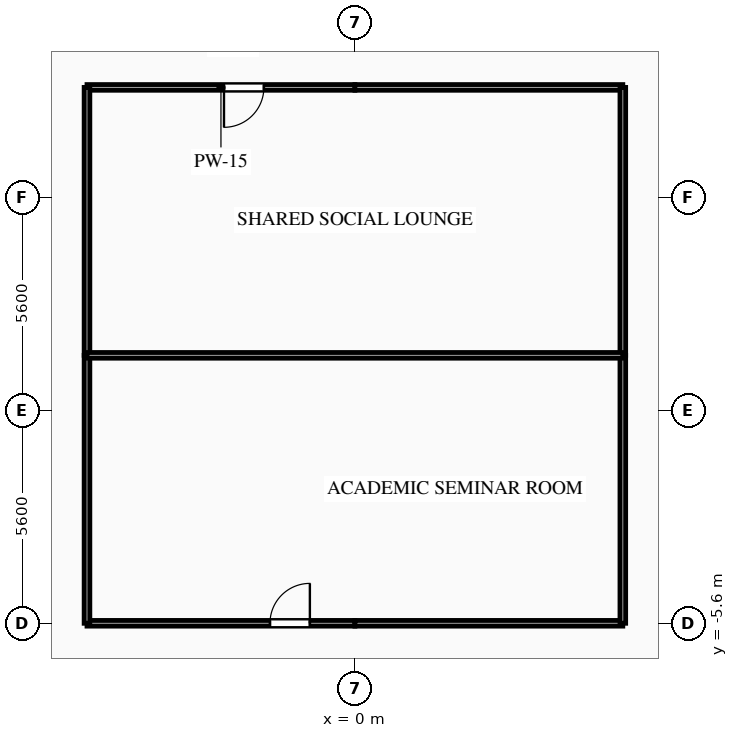
"""IFC4 building model, lengths in metres.
Left out: names, types, materials, properties, quantities, classifications, styles, units other than length and angle.
Written with IfcOpenShell. Run it as: python <this file> out.ifc"""

import sys

from ifc_helpers import new_model, si_unit, direction, frame, frame_2d, origin, place, context, subcontext, project, spatial, rectangle, extrude, element, fill, save


model = new_model("IFC4")
c1 = context("Model", 3, precision=1e-05, world=origin(), true_north=direction((0.0, 1.0)))
c2 = subcontext(c1, "Body", "Model", "MODEL_VIEW")
j1 = project(units=[si_unit("LENGTHUNIT", "METRE"), si_unit("PLANEANGLEUNIT", "RADIAN")], contexts=[c1])
p1 = place(None, origin())
s1 = spatial("IfcSite", under=j1, at=p1, CompositionType="ELEMENT")
p2 = place(p1, origin())
s2 = spatial("IfcBuilding", under=s1, at=p2, CompositionType="ELEMENT")
p3 = place(p2, frame((0.0, 0.0, 255.1)))
s3 = spatial("IfcBuildingStorey", under=s2, at=p3, CompositionType="ELEMENT", Elevation=255.1)
p4 = place(p3, frame((0.0, 8.5, 0.0), z_axis=(0.0, 0.0, 1.0), x_axis=(-1.0, 0.0, 0.0)))
e1 = element("IfcWall", 1, at=p4, inside=s3, PredefinedType="PARTITIONING", context=c2, shape_type="SweptSolid", body=[
    extrude(rectangle(XDim=7.05, YDim=0.15, at=frame_2d((3.525, 0.0))), origin(), (0.0, 0.0, 1.0), 3.04),
])
p5 = place(p4, frame((2.395, 0.0, 0.0)))
e2 = element("IfcOpeningElement", 2, at=p5, cuts=e1, PredefinedType="OPENING", context=c2, shape_type="SweptSolid", body=[
    extrude(rectangle(XDim=1.05, YDim=2.15, at=frame_2d((0.525, 1.075))), frame((0.0, 0.085, 0.0), z_axis=(0.0, -1.0, 0.0), x_axis=(1.0, 0.0, 0.0)), (0.0, 0.0, 1.0), 0.17),
])
p6 = place(p3, frame((7.05, 8.5, 0.0), z_axis=(0.0, 0.0, 1.0), x_axis=(-1.0, 0.0, 0.0)))
e3 = element("IfcWall", 3, at=p6, inside=s3, PredefinedType="PARTITIONING", context=c2, shape_type="SweptSolid", body=[
    extrude(rectangle(XDim=7.05, YDim=0.15, at=frame_2d((3.525, 0.0))), origin(), (0.0, 0.0, 1.0), 3.04),
])
p7 = place(p3, frame((-7.05, -5.6, 0.0), z_axis=(0.0, 0.0, 1.0), x_axis=(1.0, 0.0, 0.0)))
e4 = element("IfcWall", 4, at=p7, inside=s3, PredefinedType="PARTITIONING", context=c2, shape_type="SweptSolid", body=[
    extrude(rectangle(XDim=7.05, YDim=0.15, at=frame_2d((3.525, 0.0))), origin(), (0.0, 0.0, 1.0), 2.525),
])
p8 = place(p7, frame((4.815, 0.0, 0.0)))
e5 = element("IfcOpeningElement", 5, at=p8, cuts=e4, PredefinedType="OPENING", context=c2, shape_type="SweptSolid", body=[
    extrude(rectangle(XDim=1.05, YDim=2.15, at=frame_2d((0.525, 1.075))), frame((0.0, 0.085, 0.0), z_axis=(0.0, -1.0, 0.0), x_axis=(1.0, 0.0, 0.0)), (0.0, 0.0, 1.0), 0.17),
])
p9 = place(p3, frame((0.0, -5.6, 0.0), z_axis=(0.0, 0.0, 1.0), x_axis=(1.0, 0.0, 0.0)))
e6 = element("IfcWall", 6, at=p9, inside=s3, PredefinedType="PARTITIONING", context=c2, shape_type="SweptSolid", body=[
    extrude(rectangle(XDim=7.05, YDim=0.15, at=frame_2d((3.525, 0.0))), origin(), (0.0, 0.0, 1.0), 2.525),
])
for number, where, z_axis, x_axis in (
    (7, (-7.05, 1.45, 0.0), (0.0, 0.0, 1.0), (0.0, -1.0, 0.0)),
    (8, (-7.05, 8.5, 0.0), (0.0, 0.0, 1.0), (0.0, -1.0, 0.0)),
    (9, (7.05, -5.6, 0.0), (0.0, 0.0, 1.0), (0.0, 1.0, 0.0)),
    (10, (7.05, 1.45, 0.0), (0.0, 0.0, 1.0), (0.0, 1.0, 0.0)),
):
    element("IfcWall", number, at=place(p3, frame(where, z_axis=z_axis, x_axis=x_axis)), inside=s3, PredefinedType="PARTITIONING", context=c2, shape_type="SweptSolid", body=[
        extrude(rectangle(XDim=7.05, YDim=0.15, at=frame_2d((3.525, 0.0))), origin(), (0.0, 0.0, 1.0), 3.04),
    ])
p10 = place(p3, frame((-7.05, 1.45, 0.0), z_axis=(0.0, 0.0, 1.0), x_axis=(1.0, 0.0, 0.0)))
e11 = element("IfcWall", 11, at=p10, inside=s3, PredefinedType="PARTITIONING", context=c2, shape_type="SweptSolid", body=[
    extrude(rectangle(XDim=14.1, YDim=0.15, at=frame_2d((7.05, 0.0))), origin(), (0.0, 0.0, 1.0), 3.04),
])
p11 = place(p5, origin())
e12 = element("IfcDoor", 12, at=p11, inside=s3, OperationType="SINGLE_SWING_RIGHT", PredefinedType="DOOR", context=c2, shape_type="SweptSolid", body=[
    extrude(rectangle(XDim=1.05, YDim=2.15, at=frame_2d((0.525, 1.075))), frame((0.0, 0.025, 0.0), z_axis=(0.0, -1.0, 0.0), x_axis=(1.0, 0.0, 0.0)), (0.0, 0.0, 1.0), 0.05),
])
fill(e2, e12)
p12 = place(p8, origin())
e13 = element("IfcDoor", 13, at=p12, inside=s3, OperationType="SINGLE_SWING_RIGHT", PredefinedType="DOOR", context=c2, shape_type="SweptSolid", body=[
    extrude(rectangle(XDim=1.05, YDim=2.15, at=frame_2d((0.525, 1.075))), frame((0.0, 0.025, 0.0), z_axis=(0.0, -1.0, 0.0), x_axis=(1.0, 0.0, 0.0)), (0.0, 0.0, 1.0), 0.05),
])
fill(e5, e13)
save(model, sys.argv[1])
